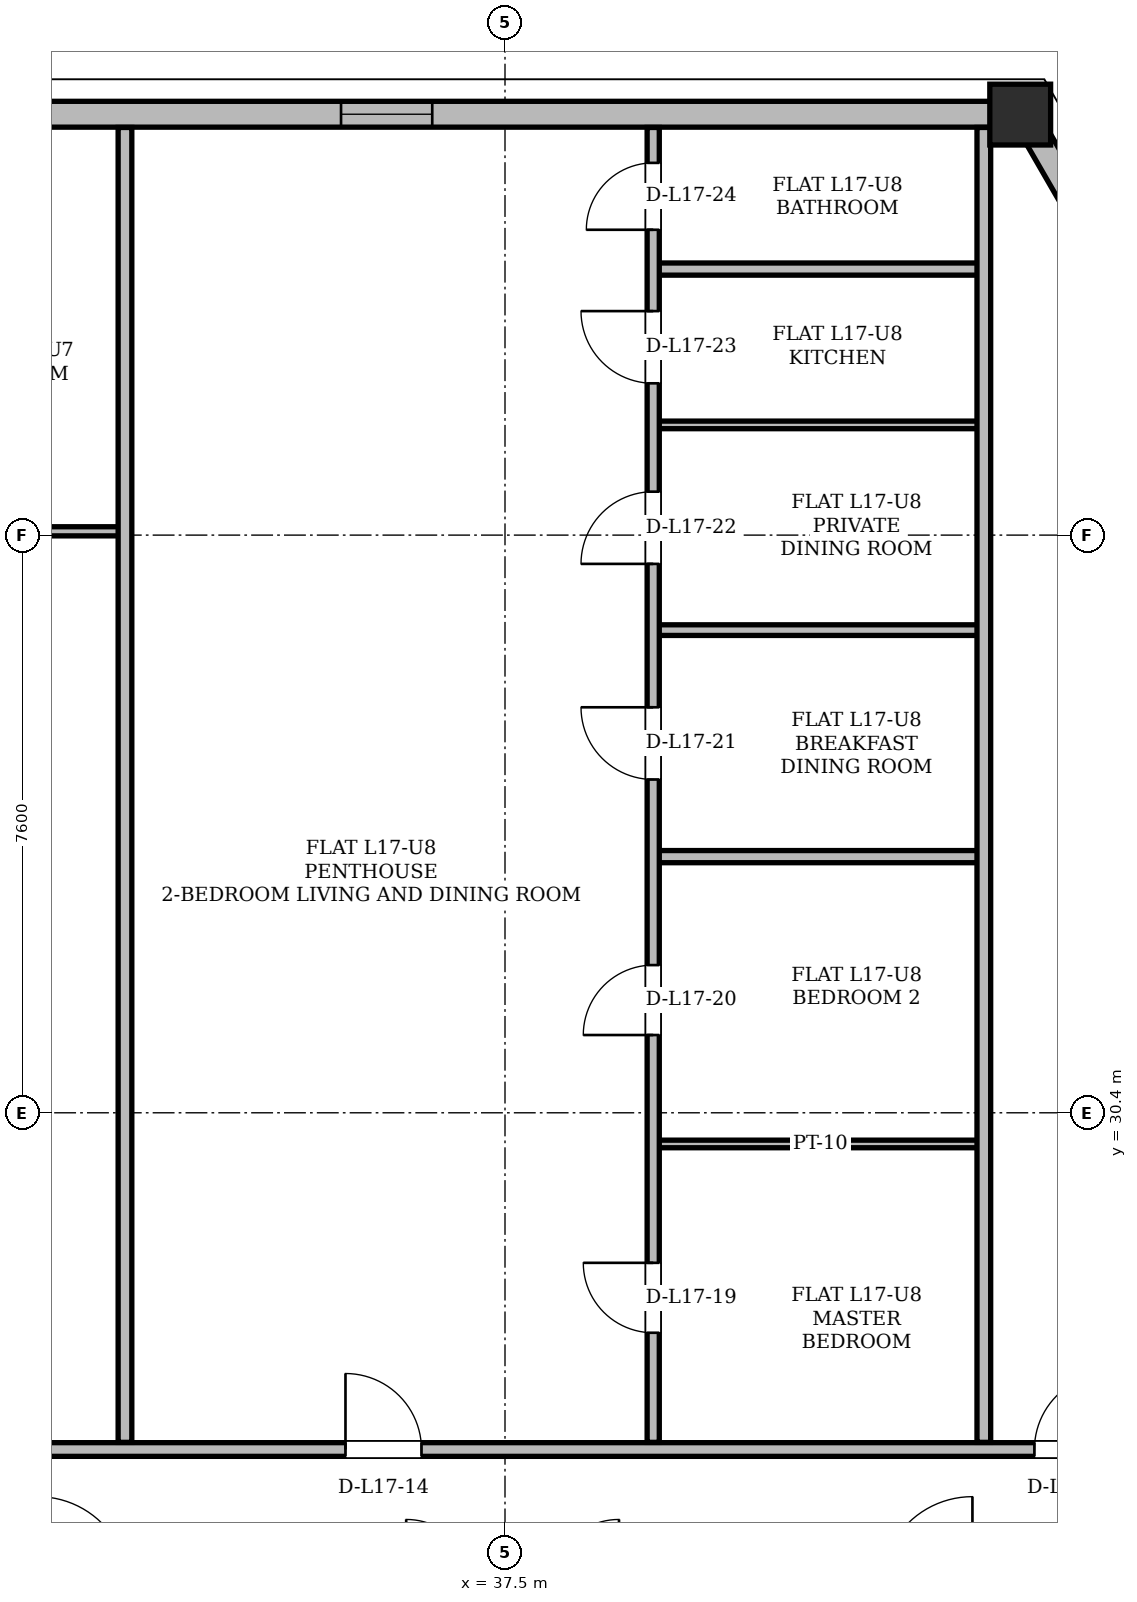
"""IFC4 building model, lengths in metres.
Left out: names, types, materials, properties, quantities, classifications, styles, units other than length and angle.
Written with IfcOpenShell. Run it as: python <this file> out.ifc"""

import sys

from ifc_helpers import new_model, si_unit, direction, frame, frame_2d, origin, origin_2d, place, context, subcontext, project, spatial, rectangle, hollow_rectangle, extrude, element, fill, save


model = new_model("IFC4")
c1 = context("Model", 3, precision=1e-05, world=origin(), true_north=direction((0.0, 1.0)))
c2 = subcontext(c1, "Body", "Model", "MODEL_VIEW")
j1 = project(units=[si_unit("LENGTHUNIT", "METRE"), si_unit("PLANEANGLEUNIT", "RADIAN")], contexts=[c1])
p1 = place(None, origin())
s1 = spatial("IfcSite", under=j1, at=p1, CompositionType="ELEMENT")
p2 = place(p1, origin())
s2 = spatial("IfcBuilding", under=s1, at=p2, CompositionType="ELEMENT")
p3 = place(p2, frame((0.0, 0.0, 66.9)))
s3 = spatial("IfcBuildingStorey", under=s2, at=p3, CompositionType="ELEMENT", Elevation=66.9)
p4 = place(p3, frame((44.331, 43.537, 0.005), z_axis=(-0.028949624745, -0.002582360893, 0.999577536082), x_axis=(0.08884909331, -0.996045098687, 0.0)))
e1 = element("IfcColumn", 1, at=p4, inside=s3, PredefinedType="COLUMN", context=c2, shape_type="SweptSolid", body=[
    extrude(hollow_rectangle(XDim=0.8, YDim=0.8, WallThickness=0.065, at=origin_2d()), origin(), (0.0, 0.0, 1.0), 3.593),
])
p5 = place(p3, frame((61.212, 14.297, 0.0), z_axis=(0.0, 0.0, 1.0), x_axis=(-0.499997235847, 0.866026999663, 0.0)))
e2 = element("IfcWall", 2, at=p5, inside=s3, PredefinedType="SOLIDWALL", context=c2, shape_type="SweptSolid", body=[
    extrude(rectangle(XDim=33.763, YDim=0.34, at=frame_2d((16.882, 0.0))), origin(), (0.0, 0.0, 1.0), 2.494),
])
p6 = place(p5, frame((7.615, 0.0, 0.0)))
e3 = element("IfcOpeningElement", 3, at=p6, cuts=e2, PredefinedType="OPENING", context=c2, shape_type="SweptSolid", body=[
    extrude(rectangle(XDim=1.5, YDim=2.2, at=frame_2d((0.75, 1.1))), frame((0.0, 0.17, 0.0), z_axis=(0.0, -1.0, 0.0), x_axis=(1.0, 0.0, 0.0)), (0.0, 0.0, 1.0), 0.34),
])
p7 = place(p5, frame((25.894, 0.0, 0.0)))
e4 = element("IfcOpeningElement", 4, at=p7, cuts=e2, PredefinedType="OPENING", context=c2, shape_type="SweptSolid", body=[
    extrude(rectangle(XDim=1.5, YDim=2.2, at=frame_2d((0.75, 1.1))), frame((0.0, 0.17, 0.0), z_axis=(0.0, -1.0, 0.0), x_axis=(1.0, 0.0, 0.0)), (0.0, 0.0, 1.0), 0.34),
])
p8 = place(p5, frame((1.594, 0.0, 0.85)))
e5 = element("IfcOpeningElement", 5, at=p8, cuts=e2, PredefinedType="OPENING", context=c2, shape_type="SweptSolid", body=[
    extrude(rectangle(XDim=1.4, YDim=1.534, at=frame_2d((0.7, 0.767))), frame((0.0, 0.17, 0.0), z_axis=(0.0, -1.0, 0.0), x_axis=(1.0, 0.0, 0.0)), (0.0, 0.0, 1.0), 0.34),
])
p9 = place(p5, frame((20.533, 0.0, 0.85)))
e6 = element("IfcOpeningElement", 6, at=p9, cuts=e2, PredefinedType="OPENING", context=c2, shape_type="SweptSolid", body=[
    extrude(rectangle(XDim=1.2, YDim=1.48, at=frame_2d((0.6, 0.74))), frame((0.0, 0.17, 0.0), z_axis=(0.0, -1.0, 0.0), x_axis=(1.0, 0.0, 0.0)), (0.0, 0.0, 1.0), 0.34),
])
p10 = place(p5, frame((29.7, 0.0, 0.85)))
e7 = element("IfcOpeningElement", 7, at=p10, cuts=e2, PredefinedType="OPENING", context=c2, shape_type="SweptSolid", body=[
    extrude(rectangle(XDim=2.2, YDim=1.534, at=frame_2d((1.1, 0.767))), frame((0.0, 0.17, 0.0), z_axis=(0.0, -1.0, 0.0), x_axis=(1.0, 0.0, 0.0)), (0.0, 0.0, 1.0), 0.34),
])
p11 = place(p5, frame((15.112, 0.0, 0.85)))
e8 = element("IfcOpeningElement", 8, at=p11, cuts=e2, PredefinedType="OPENING", context=c2, shape_type="SweptSolid", body=[
    extrude(rectangle(XDim=1.2, YDim=1.48, at=frame_2d((0.6, 0.74))), frame((0.0, 0.17, 0.0), z_axis=(0.0, -1.0, 0.0), x_axis=(1.0, 0.0, 0.0)), (0.0, 0.0, 1.0), 0.34),
])
p12 = place(p5, frame((17.864, 0.0, 0.85)))
e9 = element("IfcOpeningElement", 9, at=p12, cuts=e2, PredefinedType="OPENING", context=c2, shape_type="SweptSolid", body=[
    extrude(rectangle(XDim=1.2, YDim=1.48, at=frame_2d((0.6, 0.74))), frame((0.0, 0.17, 0.0), z_axis=(0.0, -1.0, 0.0), x_axis=(1.0, 0.0, 0.0)), (0.0, 0.0, 1.0), 0.34),
])
p13 = place(p3, frame((44.331, 43.537, 0.0), z_axis=(0.0, 0.0, 1.0), x_axis=(-1.0, 0.0, 0.0)))
e10 = element("IfcWall", 10, at=p13, inside=s3, PredefinedType="SOLIDWALL", context=c2, shape_type="SweptSolid", body=[
    extrude(rectangle(XDim=13.662, YDim=0.34, at=frame_2d((6.831, 0.0))), origin(), (0.0, 0.0, 1.0), 2.494),
])
p14 = place(p13, frame((7.788, 0.0, 0.85)))
e11 = element("IfcOpeningElement", 11, at=p14, cuts=e10, PredefinedType="OPENING", context=c2, shape_type="SweptSolid", body=[
    extrude(rectangle(XDim=1.2, YDim=1.48, at=frame_2d((0.6, 0.74))), frame((0.0, 0.17, 0.0), z_axis=(0.0, -1.0, 0.0), x_axis=(1.0, 0.0, 0.0)), (0.0, 0.0, 1.0), 0.34),
])
p15 = place(p3, frame((27.55, 25.97, 0.0), z_axis=(0.0, 0.0, 1.0), x_axis=(1.0, 0.0, 0.0)))
e12 = element("IfcWall", 12, at=p15, inside=s3, PredefinedType="PARTITIONING", context=c2, shape_type="SweptSolid", body=[
    extrude(rectangle(XDim=19.9, YDim=0.18, at=frame_2d((9.95, 0.0))), origin(), (0.0, 0.0, 1.0), 2.738),
])
p16 = place(p15, frame((2.07, 0.0, 0.0)))
e13 = element("IfcOpeningElement", 13, at=p16, cuts=e12, PredefinedType="OPENING", context=c2, shape_type="SweptSolid", body=[
    extrude(rectangle(XDim=1.0, YDim=2.18, at=frame_2d((0.5, 1.09))), frame((0.0, 0.09, 0.0), z_axis=(0.0, -1.0, 0.0), x_axis=(1.0, 0.0, 0.0)), (0.0, 0.0, 1.0), 0.18),
])
p17 = place(p15, frame((7.851, 0.0, 0.0)))
e14 = element("IfcOpeningElement", 14, at=p17, cuts=e12, PredefinedType="OPENING", context=c2, shape_type="SweptSolid", body=[
    extrude(rectangle(XDim=1.0, YDim=2.18, at=frame_2d((0.5, 1.09))), frame((0.0, 0.09, 0.0), z_axis=(0.0, -1.0, 0.0), x_axis=(1.0, 0.0, 0.0)), (0.0, 0.0, 1.0), 0.18),
])
p18 = place(p15, frame((16.916, 0.0, 0.0)))
e15 = element("IfcOpeningElement", 15, at=p18, cuts=e12, PredefinedType="OPENING", context=c2, shape_type="SweptSolid", body=[
    extrude(rectangle(XDim=1.0, YDim=2.18, at=frame_2d((0.5, 1.09))), frame((0.0, 0.09, 0.0), z_axis=(0.0, -1.0, 0.0), x_axis=(1.0, 0.0, 0.0)), (0.0, 0.0, 1.0), 0.18),
])
p19 = place(p3, frame((39.45, 29.99, 0.0), z_axis=(0.0, 0.0, 1.0), x_axis=(1.0, 0.0, 0.0)))
e16 = element("IfcWall", 16, at=p19, inside=s3, PredefinedType="PARTITIONING", context=c2, shape_type="SweptSolid", body=[
    extrude(rectangle(XDim=4.4, YDim=0.1, at=frame_2d((2.2, 0.0))), origin(), (0.0, 0.0, 1.0), 3.36),
])
p20 = place(p3, frame((39.45, 33.77, 0.0), z_axis=(0.0, 0.0, 1.0), x_axis=(1.0, 0.0, 0.0)))
e17 = element("IfcWall", 17, at=p20, inside=s3, PredefinedType="PARTITIONING", context=c2, shape_type="SweptSolid", body=[
    extrude(rectangle(XDim=4.4, YDim=0.16, at=frame_2d((2.2, 0.0))), origin(), (0.0, 0.0, 1.0), 3.36),
])
p21 = place(p3, frame((39.45, 36.75, 0.0), z_axis=(0.0, 0.0, 1.0), x_axis=(1.0, 0.0, 0.0)))
e18 = element("IfcWall", 18, at=p21, inside=s3, PredefinedType="PARTITIONING", context=c2, shape_type="SweptSolid", body=[
    extrude(rectangle(XDim=4.4, YDim=0.14, at=frame_2d((2.2, 0.0))), origin(), (0.0, 0.0, 1.0), 3.36),
])
p22 = place(p3, frame((27.702, 38.05, 0.0), z_axis=(0.0, 0.0, 1.0), x_axis=(1.0, 0.0, 0.0)))
e19 = element("IfcWall", 19, at=p22, inside=s3, PredefinedType="PARTITIONING", context=c2, shape_type="SweptSolid", body=[
    extrude(rectangle(XDim=4.88, YDim=0.12, at=frame_2d((2.44, 0.0))), origin(), (0.0, 0.0, 1.0), 2.738),
])
p23 = place(p22, frame((1.944, 0.0, 0.0)))
e20 = element("IfcOpeningElement", 20, at=p23, cuts=e19, PredefinedType="OPENING", context=c2, shape_type="SweptSolid", body=[
    extrude(rectangle(XDim=0.88, YDim=2.08, at=frame_2d((0.44, 1.04))), frame((0.0, 0.06, 0.0), z_axis=(0.0, -1.0, 0.0), x_axis=(1.0, 0.0, 0.0)), (0.0, 0.0, 1.0), 0.12),
])
p24 = place(p3, frame((39.45, 39.45, 0.0), z_axis=(0.0, 0.0, 1.0), x_axis=(1.0, 0.0, 0.0)))
e21 = element("IfcWall", 21, at=p24, inside=s3, PredefinedType="PARTITIONING", context=c2, shape_type="SweptSolid", body=[
    extrude(rectangle(XDim=4.4, YDim=0.1, at=frame_2d((2.2, 0.0))), origin(), (0.0, 0.0, 1.0), 3.36),
])
p25 = place(p3, frame((39.45, 41.5, 0.0), z_axis=(0.0, 0.0, 1.0), x_axis=(1.0, 0.0, 0.0)))
e22 = element("IfcWall", 22, at=p25, inside=s3, PredefinedType="PARTITIONING", context=c2, shape_type="SweptSolid", body=[
    extrude(rectangle(XDim=4.4, YDim=0.16, at=frame_2d((2.2, 0.0))), origin(), (0.0, 0.0, 1.0), 3.36),
])
p26 = place(p3, frame((32.5, 26.064, 0.0), z_axis=(0.0, 0.0, 1.0), x_axis=(0.0, 1.0, 0.0)))
e23 = element("IfcWall", 23, at=p26, inside=s3, PredefinedType="PARTITIONING", context=c2, shape_type="SweptSolid", body=[
    extrude(rectangle(XDim=17.299, YDim=0.18, at=frame_2d((8.649, 0.0))), origin(), (0.0, 0.0, 1.0), 3.36),
])
p27 = place(p3, frame((39.45, 26.064, 0.0), z_axis=(0.0, 0.0, 1.0), x_axis=(0.0, 1.0, 0.0)))
e24 = element("IfcWall", 24, at=p27, inside=s3, PredefinedType="PARTITIONING", context=c2, shape_type="SweptSolid", body=[
    extrude(rectangle(XDim=17.299, YDim=0.16, at=frame_2d((8.649, 0.0))), origin(), (0.0, 0.0, 1.0), 3.36),
])
p28 = place(p27, frame((1.442, 0.0, 0.0)))
e25 = element("IfcOpeningElement", 25, at=p28, cuts=e24, PredefinedType="OPENING", context=c2, shape_type="SweptSolid", body=[
    extrude(rectangle(XDim=0.92, YDim=2.12, at=frame_2d((0.46, 1.06))), frame((0.0, 0.08, 0.0), z_axis=(0.0, -1.0, 0.0), x_axis=(1.0, 0.0, 0.0)), (0.0, 0.0, 1.0), 0.16),
])
p29 = place(p27, frame((5.359, 0.0, 0.0)))
e26 = element("IfcOpeningElement", 26, at=p29, cuts=e24, PredefinedType="OPENING", context=c2, shape_type="SweptSolid", body=[
    extrude(rectangle(XDim=0.92, YDim=2.12, at=frame_2d((0.46, 1.06))), frame((0.0, 0.08, 0.0), z_axis=(0.0, -1.0, 0.0), x_axis=(1.0, 0.0, 0.0)), (0.0, 0.0, 1.0), 0.16),
])
p30 = place(p27, frame((8.721, 0.0, 0.0)))
e27 = element("IfcOpeningElement", 27, at=p30, cuts=e24, PredefinedType="OPENING", context=c2, shape_type="SweptSolid", body=[
    extrude(rectangle(XDim=0.95, YDim=2.1, at=frame_2d((0.475, 1.05))), frame((0.0, 0.08, 0.0), z_axis=(0.0, -1.0, 0.0), x_axis=(1.0, 0.0, 0.0)), (0.0, 0.0, 1.0), 0.16),
])
p31 = place(p27, frame((11.557, 0.0, 0.0)))
e28 = element("IfcOpeningElement", 28, at=p31, cuts=e24, PredefinedType="OPENING", context=c2, shape_type="SweptSolid", body=[
    extrude(rectangle(XDim=0.95, YDim=2.1, at=frame_2d((0.475, 1.05))), frame((0.0, 0.08, 0.0), z_axis=(0.0, -1.0, 0.0), x_axis=(1.0, 0.0, 0.0)), (0.0, 0.0, 1.0), 0.16),
])
p32 = place(p27, frame((13.933, 0.0, 0.0)))
e29 = element("IfcOpeningElement", 29, at=p32, cuts=e24, PredefinedType="OPENING", context=c2, shape_type="SweptSolid", body=[
    extrude(rectangle(XDim=0.95, YDim=2.1, at=frame_2d((0.475, 1.05))), frame((0.0, 0.08, 0.0), z_axis=(0.0, -1.0, 0.0), x_axis=(1.0, 0.0, 0.0)), (0.0, 0.0, 1.0), 0.16),
])
p33 = place(p27, frame((15.953, 0.0, 0.0)))
e30 = element("IfcOpeningElement", 30, at=p33, cuts=e24, PredefinedType="OPENING", context=c2, shape_type="SweptSolid", body=[
    extrude(rectangle(XDim=0.88, YDim=2.08, at=frame_2d((0.44, 1.04))), frame((0.0, 0.08, 0.0), z_axis=(0.0, -1.0, 0.0), x_axis=(1.0, 0.0, 0.0)), (0.0, 0.0, 1.0), 0.16),
])
p34 = place(p3, frame((43.8, 26.064, 0.0), z_axis=(0.0, 0.0, 1.0), x_axis=(0.0, 1.0, 0.0)))
e31 = element("IfcWall", 31, at=p34, inside=s3, PredefinedType="PARTITIONING", context=c2, shape_type="SweptSolid", body=[
    extrude(rectangle(XDim=17.299, YDim=0.18, at=frame_2d((8.649, 0.0))), origin(), (0.0, 0.0, 1.0), 3.36),
])
p35 = place(p14, origin())
e32 = element("IfcWindow", 32, at=p35, inside=s3, PartitioningType="SINGLE_PANEL", PredefinedType="WINDOW", context=c2, shape_type="SweptSolid", body=[
    extrude(rectangle(XDim=1.2, YDim=1.48, at=frame_2d((0.6, 0.74))), frame((0.0, 0.03, 0.0), z_axis=(0.0, -1.0, 0.0), x_axis=(1.0, 0.0, 0.0)), (0.0, 0.0, 1.0), 0.06),
])
fill(e11, e32)
p36 = place(p17, origin())
e33 = element("IfcDoor", 33, at=p36, inside=s3, OperationType="SINGLE_SWING_LEFT", PredefinedType="DOOR", context=c2, shape_type="SweptSolid", body=[
    extrude(rectangle(XDim=1.0, YDim=2.18, at=frame_2d((0.5, 1.09))), frame((0.0, 0.025, 0.0), z_axis=(0.0, -1.0, 0.0), x_axis=(1.0, 0.0, 0.0)), (0.0, 0.0, 1.0), 0.05),
])
fill(e14, e33)
p37 = place(p18, origin())
e34 = element("IfcDoor", 34, at=p37, inside=s3, OperationType="SINGLE_SWING_RIGHT", PredefinedType="DOOR", context=c2, shape_type="SweptSolid", body=[
    extrude(rectangle(XDim=1.0, YDim=2.18, at=frame_2d((0.5, 1.09))), frame((0.0, 0.025, 0.0), z_axis=(0.0, -1.0, 0.0), x_axis=(1.0, 0.0, 0.0)), (0.0, 0.0, 1.0), 0.05),
])
fill(e15, e34)
p38 = place(p28, origin())
e35 = element("IfcDoor", 35, at=p38, inside=s3, OperationType="SINGLE_SWING_RIGHT", PredefinedType="DOOR", context=c2, shape_type="SweptSolid", body=[
    extrude(rectangle(XDim=0.92, YDim=2.12, at=frame_2d((0.46, 1.06))), frame((0.0, 0.025, 0.0), z_axis=(0.0, -1.0, 0.0), x_axis=(1.0, 0.0, 0.0)), (0.0, 0.0, 1.0), 0.05),
])
fill(e25, e35)
p39 = place(p29, origin())
e36 = element("IfcDoor", 36, at=p39, inside=s3, OperationType="SINGLE_SWING_LEFT", PredefinedType="DOOR", context=c2, shape_type="SweptSolid", body=[
    extrude(rectangle(XDim=0.92, YDim=2.12, at=frame_2d((0.46, 1.06))), frame((0.0, 0.025, 0.0), z_axis=(0.0, -1.0, 0.0), x_axis=(1.0, 0.0, 0.0)), (0.0, 0.0, 1.0), 0.05),
])
fill(e26, e36)
p40 = place(p30, origin())
e37 = element("IfcDoor", 37, at=p40, inside=s3, OperationType="SINGLE_SWING_RIGHT", PredefinedType="DOOR", context=c2, shape_type="SweptSolid", body=[
    extrude(rectangle(XDim=0.95, YDim=2.1, at=frame_2d((0.475, 1.05))), frame((0.0, 0.025, 0.0), z_axis=(0.0, -1.0, 0.0), x_axis=(1.0, 0.0, 0.0)), (0.0, 0.0, 1.0), 0.05),
])
fill(e27, e37)
p41 = place(p31, origin())
e38 = element("IfcDoor", 38, at=p41, inside=s3, OperationType="SINGLE_SWING_LEFT", PredefinedType="DOOR", context=c2, shape_type="SweptSolid", body=[
    extrude(rectangle(XDim=0.95, YDim=2.1, at=frame_2d((0.475, 1.05))), frame((0.0, 0.025, 0.0), z_axis=(0.0, -1.0, 0.0), x_axis=(1.0, 0.0, 0.0)), (0.0, 0.0, 1.0), 0.05),
])
fill(e28, e38)
p42 = place(p32, origin())
e39 = element("IfcDoor", 39, at=p42, inside=s3, OperationType="SINGLE_SWING_RIGHT", PredefinedType="DOOR", context=c2, shape_type="SweptSolid", body=[
    extrude(rectangle(XDim=0.95, YDim=2.1, at=frame_2d((0.475, 1.05))), frame((0.0, 0.025, 0.0), z_axis=(0.0, -1.0, 0.0), x_axis=(1.0, 0.0, 0.0)), (0.0, 0.0, 1.0), 0.05),
])
fill(e29, e39)
p43 = place(p33, origin())
e40 = element("IfcDoor", 40, at=p43, inside=s3, OperationType="SINGLE_SWING_LEFT", PredefinedType="DOOR", context=c2, shape_type="SweptSolid", body=[
    extrude(rectangle(XDim=0.88, YDim=2.08, at=frame_2d((0.44, 1.04))), frame((0.0, 0.025, 0.0), z_axis=(0.0, -1.0, 0.0), x_axis=(1.0, 0.0, 0.0)), (0.0, 0.0, 1.0), 0.05),
])
fill(e30, e40)
save(model, sys.argv[1])
